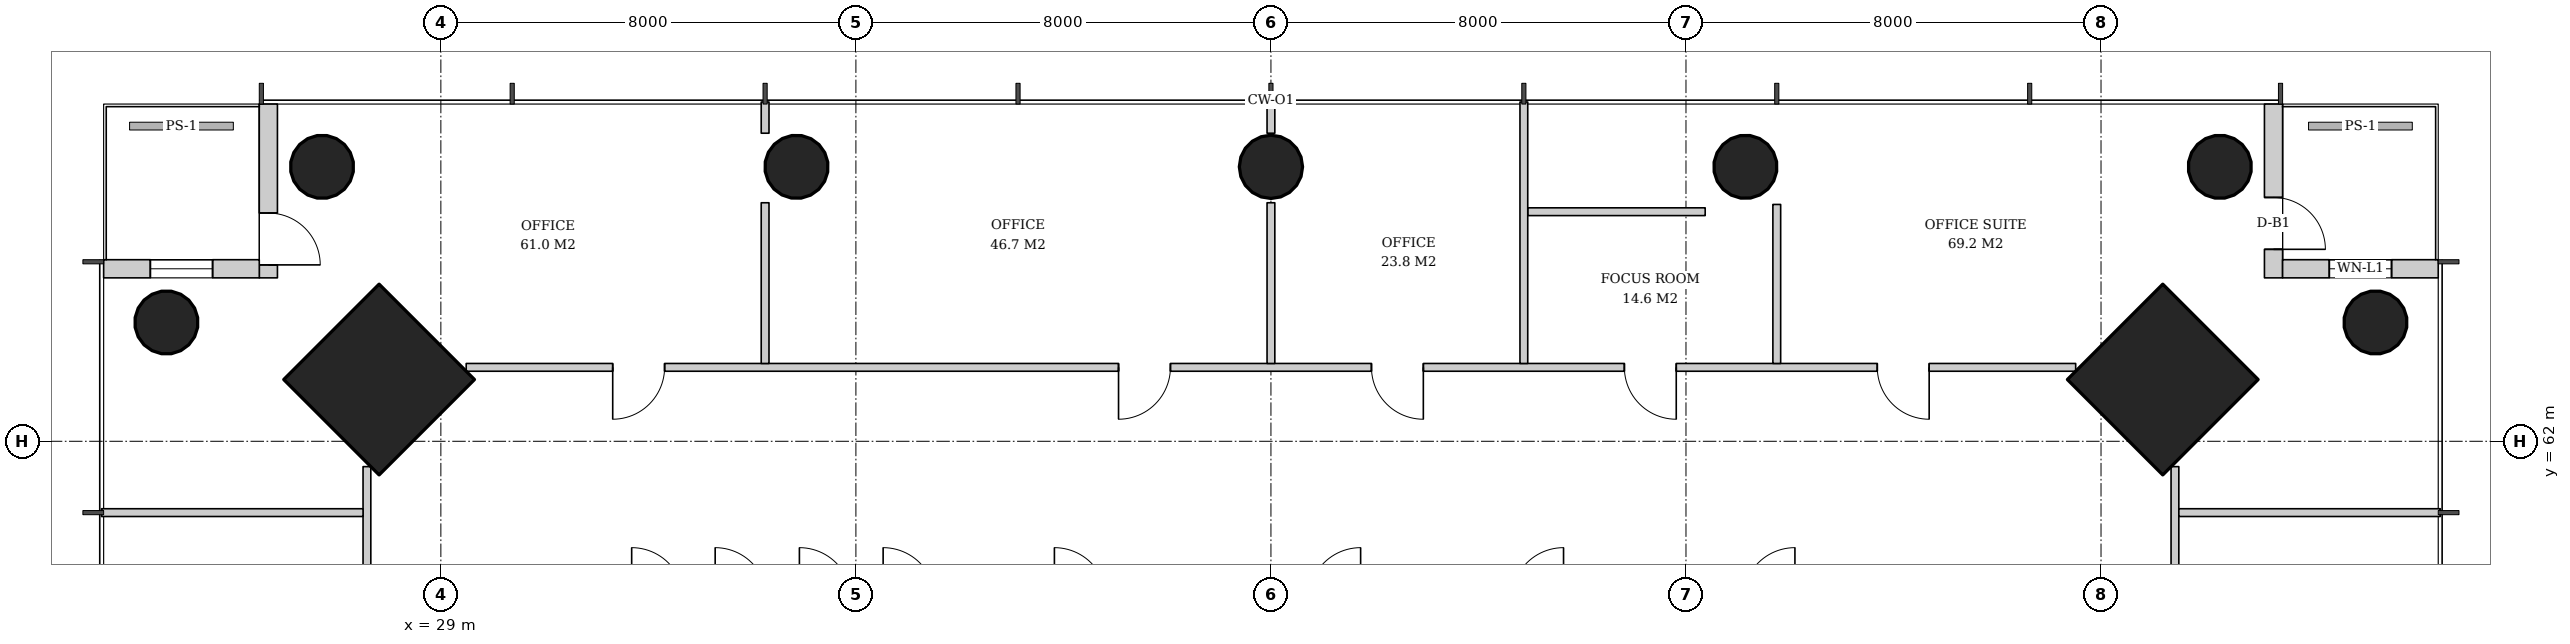
"""IFC4 building model, lengths in metres.
Left out: names, types, materials, properties, quantities, classifications, styles, units other than length and angle.
Written with IfcOpenShell. Run it as: python <this file> out.ifc"""

import sys

from ifc_helpers import new_model, si_unit, direction, frame, frame_2d, origin, origin_2d, place, context, subcontext, project, spatial, rectangle, hollow_circle, extrude, element, fill, save


model = new_model("IFC4")
c1 = context("Model", 3, precision=1e-05, world=origin(), true_north=direction((0.0, 1.0)))
c2 = subcontext(c1, "Body", "Model", "MODEL_VIEW")
j1 = project(units=[si_unit("LENGTHUNIT", "METRE"), si_unit("PLANEANGLEUNIT", "RADIAN")], contexts=[c1])
p1 = place(None, origin())
s1 = spatial("IfcSite", under=j1, at=p1, CompositionType="ELEMENT")
p2 = place(p1, origin())
s2 = spatial("IfcBuilding", under=s1, at=p2, CompositionType="ELEMENT")
p3 = place(p2, frame((0.0, 0.0, 104.6)))
s3 = spatial("IfcBuildingStorey", under=s2, at=p3, CompositionType="ELEMENT", Elevation=104.6)
p4 = place(p3, frame((62.229, 63.229, 0.0), z_axis=(-0.031900153262, -0.031900153262, 0.998981861919), x_axis=(0.707106781187, -0.707106781187, 0.0)))
e1 = element("IfcColumn", 1, at=p4, inside=s3, PredefinedType="COLUMN", context=c2, shape_type="SweptSolid", body=[
    extrude(rectangle(XDim=2.6, YDim=2.6, at=origin_2d()), origin(), (0.0, 0.0, 1.0), 3.804),
])
p5 = place(p3, frame((66.329, 64.329, 0.0), z_axis=(-0.031964207655, -0.031964207655, 0.998977766949), x_axis=(0.707106781187, -0.707106781187, 0.0)))
e2 = element("IfcColumn", 2, at=p5, inside=s3, PredefinedType="COLUMN", context=c2, shape_type="SweptSolid", body=[
    extrude(hollow_circle(Radius=0.61, WallThickness=0.04, at=origin_2d()), origin(), (0.0, 0.0, 1.0), 3.804),
])
p6 = place(p3, frame((27.771, 63.229, 0.0), z_axis=(0.031900153262, -0.031900153262, 0.998981861919), x_axis=(0.707106781187, 0.707106781187, 0.0)))
e3 = element("IfcColumn", 3, at=p6, inside=s3, PredefinedType="COLUMN", context=c2, shape_type="SweptSolid", body=[
    extrude(rectangle(XDim=2.6, YDim=2.6, at=origin_2d()), origin(), (0.0, 0.0, 1.0), 3.804),
])
for number, where, z_axis, x_axis in (
    (4, (63.329, 67.329, 0.0), (-0.032, -0.032, 0.999), (0.707, -0.707, 0.0)),
    (5, (26.671, 67.329, 0.0), (0.032, -0.032, 0.999), (0.707, 0.707, 0.0)),
):
    element("IfcColumn", number, at=place(p3, frame(where, z_axis=z_axis, x_axis=x_axis)), inside=s3, PredefinedType="COLUMN", context=c2, shape_type="SweptSolid", body=[
        extrude(hollow_circle(Radius=0.61, WallThickness=0.04, at=origin_2d()), origin(), (0.0, 0.0, 1.0), 3.804),
    ])
p7 = place(p3, frame((54.164, 67.329, 0.0), z_axis=(-0.015988230756, -0.031976461511, 0.999360736865), x_axis=(0.894427191, -0.4472135955, 0.0)))
e6 = element("IfcColumn", 6, at=p7, inside=s3, PredefinedType="COLUMN", context=c2, shape_type="SweptSolid", body=[
    extrude(hollow_circle(Radius=0.61, WallThickness=0.04, at=origin_2d()), origin(), (0.0, 0.0, 1.0), 3.802),
])
p8 = place(p3, frame((45.0, 67.329, 0.0), z_axis=(0.0, -0.031980549263, 0.999488491414), x_axis=(1.0, 0.0, 0.0)))
e7 = element("IfcColumn", 7, at=p8, inside=s3, PredefinedType="COLUMN", context=c2, shape_type="SweptSolid", body=[
    extrude(hollow_circle(Radius=0.61, WallThickness=0.04, at=origin_2d()), origin(), (0.0, 0.0, 1.0), 3.802),
])
p9 = place(p3, frame((35.836, 67.329, 0.0), z_axis=(0.015988230756, -0.031976461511, 0.999360736865), x_axis=(0.894427191, 0.4472135955, 0.0)))
e8 = element("IfcColumn", 8, at=p9, inside=s3, PredefinedType="COLUMN", context=c2, shape_type="SweptSolid", body=[
    extrude(hollow_circle(Radius=0.61, WallThickness=0.04, at=origin_2d()), origin(), (0.0, 0.0, 1.0), 3.802),
])
p10 = place(p3, frame((23.671, 64.329, 0.0), z_axis=(0.031964207655, -0.031964207655, 0.998977766949), x_axis=(0.707106781187, 0.707106781187, 0.0)))
e9 = element("IfcColumn", 9, at=p10, inside=s3, PredefinedType="COLUMN", context=c2, shape_type="SweptSolid", body=[
    extrude(hollow_circle(Radius=0.61, WallThickness=0.04, at=origin_2d()), origin(), (0.0, 0.0, 1.0), 3.804),
])
p11 = place(p3, frame((64.325, 68.5, 0.0), z_axis=(0.0, 0.0, 1.0), x_axis=(0.0, -1.0, 0.0)))
e10 = element("IfcWall", 10, at=p11, inside=s3, PredefinedType="SOLIDWALL", context=c2, shape_type="SweptSolid", body=[
    extrude(rectangle(XDim=3.35, YDim=0.35, at=frame_2d((1.675, 0.0))), origin(), (0.0, 0.0, 1.0), 3.62),
])
p12 = place(p11, frame((1.8, 0.0, 0.0)))
e11 = element("IfcOpeningElement", 11, at=p12, cuts=e10, PredefinedType="OPENING", context=c2, shape_type="SweptSolid", body=[
    extrude(rectangle(XDim=1.0, YDim=2.4, at=frame_2d((0.5, 1.2))), frame((0.0, 0.185, 0.0), z_axis=(0.0, -1.0, 0.0), x_axis=(1.0, 0.0, 0.0)), (0.0, 0.0, 1.0), 0.37),
])
p13 = place(p3, frame((64.5, 65.325, 0.0), z_axis=(0.0, 0.0, 1.0), x_axis=(1.0, 0.0, 0.0)))
e12 = element("IfcWall", 12, at=p13, inside=s3, PredefinedType="SOLIDWALL", context=c2, shape_type="SweptSolid", body=[
    extrude(rectangle(XDim=3.0, YDim=0.35, at=frame_2d((1.5, 0.0))), origin(), (0.0, 0.0, 1.0), 3.62),
])
p14 = place(p13, frame((0.9, 0.0, 0.6)))
e13 = element("IfcOpeningElement", 13, at=p14, cuts=e12, PredefinedType="OPENING", context=c2, shape_type="SweptSolid", body=[
    extrude(rectangle(XDim=1.2, YDim=2.55, at=frame_2d((0.6, 1.275))), frame((0.0, 0.185, 0.0), z_axis=(0.0, -1.0, 0.0), x_axis=(1.0, 0.0, 0.0)), (0.0, 0.0, 1.0), 0.37),
])
p15 = place(p3, frame((25.675, 68.5, 0.0), z_axis=(0.0, 0.0, 1.0), x_axis=(0.0, -1.0, 0.0)))
e14 = element("IfcWall", 14, at=p15, inside=s3, PredefinedType="SOLIDWALL", context=c2, shape_type="SweptSolid", body=[
    extrude(rectangle(XDim=3.35, YDim=0.35, at=frame_2d((1.675, 0.0))), origin(), (0.0, 0.0, 1.0), 3.62),
])
p16 = place(p15, frame((2.1, 0.0, 0.0)))
e15 = element("IfcOpeningElement", 15, at=p16, cuts=e14, PredefinedType="OPENING", context=c2, shape_type="SweptSolid", body=[
    extrude(rectangle(XDim=1.0, YDim=2.4, at=frame_2d((0.5, 1.2))), frame((0.0, 0.185, 0.0), z_axis=(0.0, -1.0, 0.0), x_axis=(1.0, 0.0, 0.0)), (0.0, 0.0, 1.0), 0.37),
])
p17 = place(p3, frame((25.5, 65.325, 0.0), z_axis=(0.0, 0.0, 1.0), x_axis=(-1.0, 0.0, 0.0)))
e16 = element("IfcWall", 16, at=p17, inside=s3, PredefinedType="SOLIDWALL", context=c2, shape_type="SweptSolid", body=[
    extrude(rectangle(XDim=3.0, YDim=0.35, at=frame_2d((1.5, 0.0))), origin(), (0.0, 0.0, 1.0), 3.62),
])
p18 = place(p17, frame((0.9, 0.0, 0.6)))
e17 = element("IfcOpeningElement", 17, at=p18, cuts=e16, PredefinedType="OPENING", context=c2, shape_type="SweptSolid", body=[
    extrude(rectangle(XDim=1.2, YDim=2.55, at=frame_2d((0.6, 1.275))), frame((0.0, 0.185, 0.0), z_axis=(0.0, -1.0, 0.0), x_axis=(1.0, 0.0, 0.0)), (0.0, 0.0, 1.0), 0.37),
])
p19 = place(p3, frame((62.425, 30.489, 0.0), z_axis=(0.0, 0.0, 1.0), x_axis=(0.0, 1.0, 0.0)))
e18 = element("IfcWall", 18, at=p19, inside=s3, PredefinedType="PARTITIONING", context=c2, shape_type="SweptSolid", body=[
    extrude(rectangle(XDim=31.023, YDim=0.15, at=frame_2d((15.511, 0.0))), origin(), (0.0, 0.0, 1.0), 2.72),
])
p20 = place(p19, frame((2.824, 0.0, 0.0)))
e19 = element("IfcOpeningElement", 19, at=p20, cuts=e18, PredefinedType="OPENING", context=c2, shape_type="SweptSolid", body=[
    extrude(rectangle(XDim=1.0, YDim=2.1, at=frame_2d((0.5, 1.05))), frame((0.0, 0.085, 0.0), z_axis=(0.0, -1.0, 0.0), x_axis=(1.0, 0.0, 0.0)), (0.0, 0.0, 1.0), 0.17),
])
p21 = place(p19, frame((7.699, 0.0, 0.0)))
e20 = element("IfcOpeningElement", 20, at=p21, cuts=e18, PredefinedType="OPENING", context=c2, shape_type="SweptSolid", body=[
    extrude(rectangle(XDim=1.0, YDim=2.1, at=frame_2d((0.5, 1.05))), frame((0.0, 0.085, 0.0), z_axis=(0.0, -1.0, 0.0), x_axis=(1.0, 0.0, 0.0)), (0.0, 0.0, 1.0), 0.17),
])
p22 = place(p19, frame((12.574, 0.0, 0.0)))
e21 = element("IfcOpeningElement", 21, at=p22, cuts=e18, PredefinedType="OPENING", context=c2, shape_type="SweptSolid", body=[
    extrude(rectangle(XDim=1.0, YDim=2.1, at=frame_2d((0.5, 1.05))), frame((0.0, 0.085, 0.0), z_axis=(0.0, -1.0, 0.0), x_axis=(1.0, 0.0, 0.0)), (0.0, 0.0, 1.0), 0.17),
])
p23 = place(p19, frame((17.449, 0.0, 0.0)))
e22 = element("IfcOpeningElement", 22, at=p23, cuts=e18, PredefinedType="OPENING", context=c2, shape_type="SweptSolid", body=[
    extrude(rectangle(XDim=1.0, YDim=2.1, at=frame_2d((0.5, 1.05))), frame((0.0, 0.085, 0.0), z_axis=(0.0, -1.0, 0.0), x_axis=(1.0, 0.0, 0.0)), (0.0, 0.0, 1.0), 0.17),
])
p24 = place(p19, frame((22.324, 0.0, 0.0)))
e23 = element("IfcOpeningElement", 23, at=p24, cuts=e18, PredefinedType="OPENING", context=c2, shape_type="SweptSolid", body=[
    extrude(rectangle(XDim=1.0, YDim=2.1, at=frame_2d((0.5, 1.05))), frame((0.0, 0.085, 0.0), z_axis=(0.0, -1.0, 0.0), x_axis=(1.0, 0.0, 0.0)), (0.0, 0.0, 1.0), 0.17),
])
p25 = place(p19, frame((27.199, 0.0, 0.0)))
e24 = element("IfcOpeningElement", 24, at=p25, cuts=e18, PredefinedType="OPENING", context=c2, shape_type="SweptSolid", body=[
    extrude(rectangle(XDim=1.0, YDim=2.1, at=frame_2d((0.5, 1.05))), frame((0.0, 0.085, 0.0), z_axis=(0.0, -1.0, 0.0), x_axis=(1.0, 0.0, 0.0)), (0.0, 0.0, 1.0), 0.17),
])
p26 = place(p3, frame((62.5, 60.625, 0.0), z_axis=(0.0, 0.0, 1.0), x_axis=(1.0, 0.0, 0.0)))
e25 = element("IfcWall", 25, at=p26, inside=s3, PredefinedType="PARTITIONING", context=c2, shape_type="SweptSolid", body=[
    extrude(rectangle(XDim=5.04, YDim=0.15, at=frame_2d((2.52, 0.0))), origin(), (0.0, 0.0, 1.0), 2.82),
])
p27 = place(p3, frame((53.37, 66.425, 0.0), z_axis=(0.0, 0.0, 1.0), x_axis=(-1.0, 0.0, 0.0)))
e26 = element("IfcWall", 26, at=p27, inside=s3, PredefinedType="PARTITIONING", context=c2, shape_type="SweptSolid", body=[
    extrude(rectangle(XDim=3.42, YDim=0.15, at=frame_2d((1.71, 0.0))), origin(), (0.0, 0.0, 1.0), 3.62),
])
p28 = place(p3, frame((60.511, 63.425, 0.0), z_axis=(0.0, 0.0, 1.0), x_axis=(-1.0, 0.0, 0.0)))
e27 = element("IfcWall", 27, at=p28, inside=s3, PredefinedType="PARTITIONING", context=c2, shape_type="SweptSolid", body=[
    extrude(rectangle(XDim=31.023, YDim=0.15, at=frame_2d((15.511, 0.0))), origin(), (0.0, 0.0, 1.0), 2.72),
])
p29 = place(p28, frame((2.824, 0.0, 0.0)))
e28 = element("IfcOpeningElement", 28, at=p29, cuts=e27, PredefinedType="OPENING", context=c2, shape_type="SweptSolid", body=[
    extrude(rectangle(XDim=1.0, YDim=2.1, at=frame_2d((0.5, 1.05))), frame((0.0, 0.085, 0.0), z_axis=(0.0, -1.0, 0.0), x_axis=(1.0, 0.0, 0.0)), (0.0, 0.0, 1.0), 0.17),
])
p30 = place(p28, frame((7.699, 0.0, 0.0)))
e29 = element("IfcOpeningElement", 29, at=p30, cuts=e27, PredefinedType="OPENING", context=c2, shape_type="SweptSolid", body=[
    extrude(rectangle(XDim=1.0, YDim=2.1, at=frame_2d((0.5, 1.05))), frame((0.0, 0.085, 0.0), z_axis=(0.0, -1.0, 0.0), x_axis=(1.0, 0.0, 0.0)), (0.0, 0.0, 1.0), 0.17),
])
p31 = place(p28, frame((12.574, 0.0, 0.0)))
e30 = element("IfcOpeningElement", 30, at=p31, cuts=e27, PredefinedType="OPENING", context=c2, shape_type="SweptSolid", body=[
    extrude(rectangle(XDim=1.0, YDim=2.1, at=frame_2d((0.5, 1.05))), frame((0.0, 0.085, 0.0), z_axis=(0.0, -1.0, 0.0), x_axis=(1.0, 0.0, 0.0)), (0.0, 0.0, 1.0), 0.17),
])
p32 = place(p28, frame((17.449, 0.0, 0.0)))
e31 = element("IfcOpeningElement", 31, at=p32, cuts=e27, PredefinedType="OPENING", context=c2, shape_type="SweptSolid", body=[
    extrude(rectangle(XDim=1.0, YDim=2.1, at=frame_2d((0.5, 1.05))), frame((0.0, 0.085, 0.0), z_axis=(0.0, -1.0, 0.0), x_axis=(1.0, 0.0, 0.0)), (0.0, 0.0, 1.0), 0.17),
])
p33 = place(p28, frame((27.199, 0.0, 0.0)))
e32 = element("IfcOpeningElement", 32, at=p33, cuts=e27, PredefinedType="OPENING", context=c2, shape_type="SweptSolid", body=[
    extrude(rectangle(XDim=1.0, YDim=2.1, at=frame_2d((0.5, 1.05))), frame((0.0, 0.085, 0.0), z_axis=(0.0, -1.0, 0.0), x_axis=(1.0, 0.0, 0.0)), (0.0, 0.0, 1.0), 0.17),
])
p34 = place(p3, frame((54.75, 63.5, 0.0), z_axis=(0.0, 0.0, 1.0), x_axis=(0.0, 1.0, 0.0)))
e33 = element("IfcWall", 33, at=p34, inside=s3, PredefinedType="PARTITIONING", context=c2, shape_type="SweptSolid", body=[
    extrude(rectangle(XDim=3.065, YDim=0.15, at=frame_2d((1.532, 0.0))), origin(), (0.0, 0.0, 1.0), 3.62),
])
p35 = place(p3, frame((49.875, 63.5, 0.0), z_axis=(0.0, 0.0, 1.0), x_axis=(0.0, 1.0, 0.0)))
e34 = element("IfcWall", 34, at=p35, inside=s3, PredefinedType="PARTITIONING", context=c2, shape_type="SweptSolid", body=[
    extrude(rectangle(XDim=5.04, YDim=0.15, at=frame_2d((2.52, 0.0))), origin(), (0.0, 0.0, 1.0), 2.82),
])
p36 = place(p3, frame((45.0, 63.5, 0.0), z_axis=(0.0, 0.0, 1.0), x_axis=(0.0, 1.0, 0.0)))
e35 = element("IfcWall", 35, at=p36, inside=s3, PredefinedType="PARTITIONING", context=c2, shape_type="SweptSolid", body=[
    extrude(rectangle(XDim=3.098, YDim=0.15, at=frame_2d((1.549, 0.0))), origin(), (0.0, 0.0, 1.0), 2.858),
])
p37 = place(p3, frame((45.0, 67.938, 0.0), z_axis=(0.0, 0.0, 1.0), x_axis=(0.0, 1.0, 0.0)))
e36 = element("IfcWall", 36, at=p37, inside=s3, PredefinedType="PARTITIONING", context=c2, shape_type="SweptSolid", body=[
    extrude(rectangle(XDim=0.602, YDim=0.15, at=frame_2d((0.301, 0.0))), origin(), (0.0, 0.0, 1.0), 3.62),
])
p38 = place(p3, frame((35.25, 63.5, 0.0), z_axis=(0.0, 0.0, 1.0), x_axis=(0.0, 1.0, 0.0)))
e37 = element("IfcWall", 37, at=p38, inside=s3, PredefinedType="PARTITIONING", context=c2, shape_type="SweptSolid", body=[
    extrude(rectangle(XDim=3.098, YDim=0.15, at=frame_2d((1.549, 0.0))), origin(), (0.0, 0.0, 1.0), 3.62),
])
p39 = place(p3, frame((35.25, 67.938, 0.0), z_axis=(0.0, 0.0, 1.0), x_axis=(0.0, 1.0, 0.0)))
e38 = element("IfcWall", 38, at=p39, inside=s3, PredefinedType="PARTITIONING", context=c2, shape_type="SweptSolid", body=[
    extrude(rectangle(XDim=0.602, YDim=0.15, at=frame_2d((0.301, 0.0))), origin(), (0.0, 0.0, 1.0), 3.62),
])
p40 = place(p3, frame((27.575, 61.511, 0.0), z_axis=(0.0, 0.0, 1.0), x_axis=(0.0, -1.0, 0.0)))
e39 = element("IfcWall", 39, at=p40, inside=s3, PredefinedType="PARTITIONING", context=c2, shape_type="SweptSolid", body=[
    extrude(rectangle(XDim=31.023, YDim=0.15, at=frame_2d((15.511, 0.0))), origin(), (0.0, 0.0, 1.0), 2.72),
])
p41 = place(p40, frame((2.824, 0.0, 0.0)))
e40 = element("IfcOpeningElement", 40, at=p41, cuts=e39, PredefinedType="OPENING", context=c2, shape_type="SweptSolid", body=[
    extrude(rectangle(XDim=1.0, YDim=2.1, at=frame_2d((0.5, 1.05))), frame((0.0, 0.085, 0.0), z_axis=(0.0, -1.0, 0.0), x_axis=(1.0, 0.0, 0.0)), (0.0, 0.0, 1.0), 0.17),
])
p42 = place(p40, frame((7.699, 0.0, 0.0)))
e41 = element("IfcOpeningElement", 41, at=p42, cuts=e39, PredefinedType="OPENING", context=c2, shape_type="SweptSolid", body=[
    extrude(rectangle(XDim=1.0, YDim=2.1, at=frame_2d((0.5, 1.05))), frame((0.0, 0.085, 0.0), z_axis=(0.0, -1.0, 0.0), x_axis=(1.0, 0.0, 0.0)), (0.0, 0.0, 1.0), 0.17),
])
p43 = place(p40, frame((12.574, 0.0, 0.0)))
e42 = element("IfcOpeningElement", 42, at=p43, cuts=e39, PredefinedType="OPENING", context=c2, shape_type="SweptSolid", body=[
    extrude(rectangle(XDim=1.0, YDim=2.1, at=frame_2d((0.5, 1.05))), frame((0.0, 0.085, 0.0), z_axis=(0.0, -1.0, 0.0), x_axis=(1.0, 0.0, 0.0)), (0.0, 0.0, 1.0), 0.17),
])
p44 = place(p40, frame((17.549, 0.0, 0.0)))
e43 = element("IfcOpeningElement", 43, at=p44, cuts=e39, PredefinedType="OPENING", context=c2, shape_type="SweptSolid", body=[
    extrude(rectangle(XDim=0.8, YDim=2.1, at=frame_2d((0.4, 1.05))), frame((0.0, 0.085, 0.0), z_axis=(0.0, -1.0, 0.0), x_axis=(1.0, 0.0, 0.0)), (0.0, 0.0, 1.0), 0.17),
])
p45 = place(p40, frame((22.324, 0.0, 0.0)))
e44 = element("IfcOpeningElement", 44, at=p45, cuts=e39, PredefinedType="OPENING", context=c2, shape_type="SweptSolid", body=[
    extrude(rectangle(XDim=1.0, YDim=2.1, at=frame_2d((0.5, 1.05))), frame((0.0, 0.085, 0.0), z_axis=(0.0, -1.0, 0.0), x_axis=(1.0, 0.0, 0.0)), (0.0, 0.0, 1.0), 0.17),
])
p46 = place(p40, frame((27.299, 0.0, 0.0)))
e45 = element("IfcOpeningElement", 45, at=p46, cuts=e39, PredefinedType="OPENING", context=c2, shape_type="SweptSolid", body=[
    extrude(rectangle(XDim=0.8, YDim=2.1, at=frame_2d((0.4, 1.05))), frame((0.0, 0.085, 0.0), z_axis=(0.0, -1.0, 0.0), x_axis=(1.0, 0.0, 0.0)), (0.0, 0.0, 1.0), 0.17),
])
p47 = place(p3, frame((27.5, 60.625, 0.0), z_axis=(0.0, 0.0, 1.0), x_axis=(-1.0, 0.0, 0.0)))
e46 = element("IfcWall", 46, at=p47, inside=s3, PredefinedType="PARTITIONING", context=c2, shape_type="SweptSolid", body=[
    extrude(rectangle(XDim=5.04, YDim=0.15, at=frame_2d((2.52, 0.0))), origin(), (0.0, 0.0, 1.0), 2.82),
])
p48 = place(p12, origin())
e47 = element("IfcDoor", 47, at=p48, inside=s3, OperationType="SINGLE_SWING_RIGHT", PredefinedType="DOOR", context=c2, shape_type="SweptSolid", body=[
    extrude(rectangle(XDim=1.0, YDim=2.4, at=frame_2d((0.5, 1.2))), frame((0.0, 0.025, 0.0), z_axis=(0.0, -1.0, 0.0), x_axis=(1.0, 0.0, 0.0)), (0.0, 0.0, 1.0), 0.05),
])
fill(e11, e47)
p49 = place(p14, origin())
e48 = element("IfcWindow", 48, at=p49, inside=s3, PartitioningType="SINGLE_PANEL", PredefinedType="WINDOW", context=c2, shape_type="SweptSolid", body=[
    extrude(rectangle(XDim=1.2, YDim=2.55, at=frame_2d((0.6, 1.275))), frame((0.0, 0.03, 0.0), z_axis=(0.0, -1.0, 0.0), x_axis=(1.0, 0.0, 0.0)), (0.0, 0.0, 1.0), 0.06),
])
fill(e13, e48)
p50 = place(p16, origin())
e49 = element("IfcDoor", 49, at=p50, inside=s3, OperationType="SINGLE_SWING_RIGHT", PredefinedType="DOOR", context=c2, shape_type="SweptSolid", body=[
    extrude(rectangle(XDim=1.0, YDim=2.4, at=frame_2d((0.5, 1.2))), frame((0.0, 0.025, 0.0), z_axis=(0.0, -1.0, 0.0), x_axis=(1.0, 0.0, 0.0)), (0.0, 0.0, 1.0), 0.05),
])
fill(e15, e49)
p51 = place(p18, origin())
e50 = element("IfcWindow", 50, at=p51, inside=s3, PartitioningType="SINGLE_PANEL", PredefinedType="WINDOW", context=c2, shape_type="SweptSolid", body=[
    extrude(rectangle(XDim=1.2, YDim=2.55, at=frame_2d((0.6, 1.275))), frame((0.0, 0.03, 0.0), z_axis=(0.0, -1.0, 0.0), x_axis=(1.0, 0.0, 0.0)), (0.0, 0.0, 1.0), 0.06),
])
fill(e17, e50)
p52 = place(p29, origin())
e51 = element("IfcDoor", 51, at=p52, inside=s3, OperationType="SINGLE_SWING_LEFT", PredefinedType="DOOR", context=c2, shape_type="SweptSolid", body=[
    extrude(rectangle(XDim=1.0, YDim=2.1, at=frame_2d((0.5, 1.05))), frame((0.0, 0.025, 0.0), z_axis=(0.0, -1.0, 0.0), x_axis=(1.0, 0.0, 0.0)), (0.0, 0.0, 1.0), 0.05),
])
fill(e28, e51)
p53 = place(p30, origin())
e52 = element("IfcDoor", 52, at=p53, inside=s3, OperationType="SINGLE_SWING_LEFT", PredefinedType="DOOR", context=c2, shape_type="SweptSolid", body=[
    extrude(rectangle(XDim=1.0, YDim=2.1, at=frame_2d((0.5, 1.05))), frame((0.0, 0.025, 0.0), z_axis=(0.0, -1.0, 0.0), x_axis=(1.0, 0.0, 0.0)), (0.0, 0.0, 1.0), 0.05),
])
fill(e29, e52)
p54 = place(p31, origin())
e53 = element("IfcDoor", 53, at=p54, inside=s3, OperationType="SINGLE_SWING_LEFT", PredefinedType="DOOR", context=c2, shape_type="SweptSolid", body=[
    extrude(rectangle(XDim=1.0, YDim=2.1, at=frame_2d((0.5, 1.05))), frame((0.0, 0.025, 0.0), z_axis=(0.0, -1.0, 0.0), x_axis=(1.0, 0.0, 0.0)), (0.0, 0.0, 1.0), 0.05),
])
fill(e30, e53)
p55 = place(p32, origin())
e54 = element("IfcDoor", 54, at=p55, inside=s3, OperationType="SINGLE_SWING_RIGHT", PredefinedType="DOOR", context=c2, shape_type="SweptSolid", body=[
    extrude(rectangle(XDim=1.0, YDim=2.1, at=frame_2d((0.5, 1.05))), frame((0.0, 0.025, 0.0), z_axis=(0.0, -1.0, 0.0), x_axis=(1.0, 0.0, 0.0)), (0.0, 0.0, 1.0), 0.05),
])
fill(e31, e54)
p56 = place(p33, origin())
e55 = element("IfcDoor", 55, at=p56, inside=s3, OperationType="SINGLE_SWING_RIGHT", PredefinedType="DOOR", context=c2, shape_type="SweptSolid", body=[
    extrude(rectangle(XDim=1.0, YDim=2.1, at=frame_2d((0.5, 1.05))), frame((0.0, 0.025, 0.0), z_axis=(0.0, -1.0, 0.0), x_axis=(1.0, 0.0, 0.0)), (0.0, 0.0, 1.0), 0.05),
])
fill(e32, e55)
save(model, sys.argv[1])
